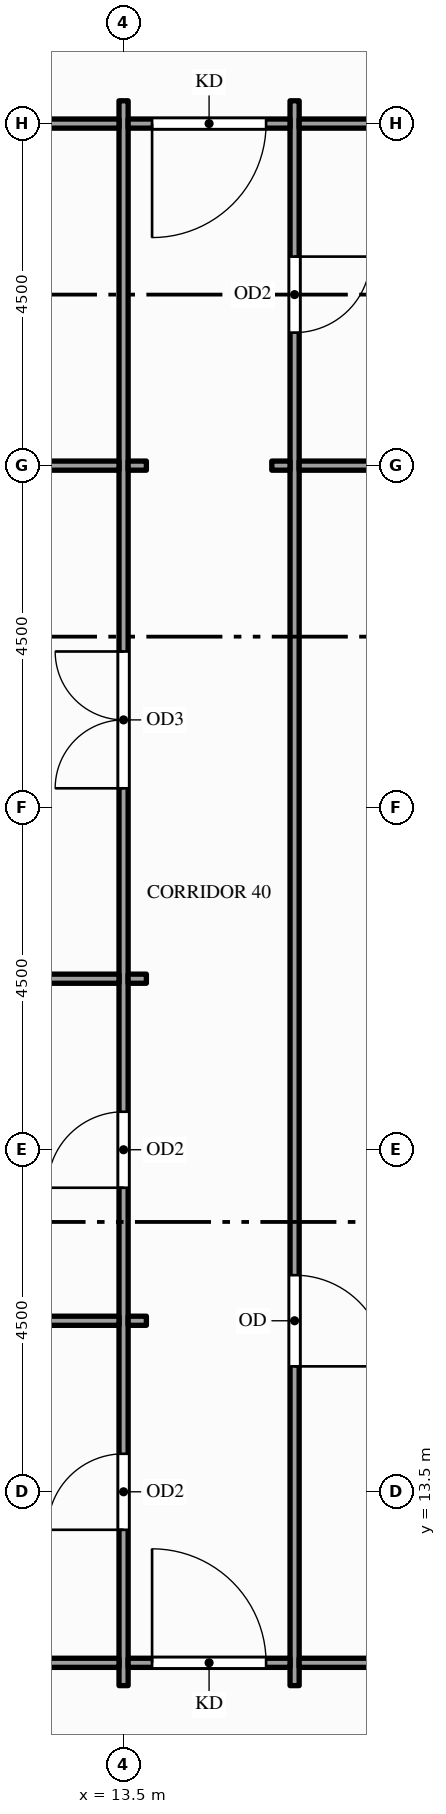
"""IFC4 building model, lengths in metres.
Left out: names, types, materials, properties, quantities, classifications, styles, units other than length and angle.
Written with IfcOpenShell. Run it as: python <this file> out.ifc"""

import sys

from ifc_helpers import new_model, si_unit, direction, frame, frame_2d, origin, place, context, subcontext, project, spatial, rectangle, extrude, element, fill, save


model = new_model("IFC4")
c1 = context("Model", 3, precision=1e-05, world=origin(), true_north=direction((0.0, 1.0)))
c2 = subcontext(c1, "Body", "Model", "MODEL_VIEW")
j1 = project(units=[si_unit("LENGTHUNIT", "METRE"), si_unit("PLANEANGLEUNIT", "RADIAN")], contexts=[c1])
p1 = place(None, origin())
s1 = spatial("IfcSite", under=j1, at=p1, CompositionType="ELEMENT")
p2 = place(p1, origin())
s2 = spatial("IfcBuilding", under=s1, at=p2, CompositionType="ELEMENT")
p3 = place(p2, frame((0.0, 0.0, 61.0)))
s3 = spatial("IfcBuildingStorey", under=s2, at=p3, CompositionType="ELEMENT", Elevation=61.0)
p4 = place(p3, frame((13.5, 10.95, 0.0), z_axis=(0.0, 0.0, 1.0), x_axis=(0.0, 1.0, 0.0)))
e1 = element("IfcWall", 1, at=p4, inside=s3, PredefinedType="PARTITIONING", context=c2, shape_type="SweptSolid", body=[
    extrude(rectangle(XDim=20.85, YDim=0.12, at=frame_2d((10.425, 0.0))), origin(), (0.0, 0.0, 1.0), 2.6),
])
p5 = place(p4, frame((2.05, 0.0, 0.0)))
e2 = element("IfcOpeningElement", 2, at=p5, cuts=e1, PredefinedType="OPENING", context=c2, shape_type="SweptSolid", body=[
    extrude(rectangle(XDim=1.0, YDim=2.1, at=frame_2d((0.5, 1.05))), frame((0.0, 0.07, 0.0), z_axis=(0.0, -1.0, 0.0), x_axis=(1.0, 0.0, 0.0)), (0.0, 0.0, 1.0), 0.14),
])
p6 = place(p4, frame((6.55, 0.0, 0.0)))
e3 = element("IfcOpeningElement", 3, at=p6, cuts=e1, PredefinedType="OPENING", context=c2, shape_type="SweptSolid", body=[
    extrude(rectangle(XDim=1.0, YDim=2.1, at=frame_2d((0.5, 1.05))), frame((0.0, 0.07, 0.0), z_axis=(0.0, -1.0, 0.0), x_axis=(1.0, 0.0, 0.0)), (0.0, 0.0, 1.0), 0.14),
])
p7 = place(p4, frame((11.805, 0.0, 0.0)))
e4 = element("IfcOpeningElement", 4, at=p7, cuts=e1, PredefinedType="OPENING", context=c2, shape_type="SweptSolid", body=[
    extrude(rectangle(XDim=1.8, YDim=2.1, at=frame_2d((0.9, 1.05))), frame((0.0, 0.07, 0.0), z_axis=(0.0, -1.0, 0.0), x_axis=(1.0, 0.0, 0.0)), (0.0, 0.0, 1.0), 0.14),
])
p8 = place(p3, frame((15.75, 10.95, 0.0), z_axis=(0.0, 0.0, 1.0), x_axis=(0.0, 1.0, 0.0)))
e5 = element("IfcWall", 5, at=p8, inside=s3, PredefinedType="PARTITIONING", context=c2, shape_type="SweptSolid", body=[
    extrude(rectangle(XDim=20.85, YDim=0.12, at=frame_2d((10.425, 0.0))), origin(), (0.0, 0.0, 1.0), 2.6),
])
p9 = place(p8, frame((17.8, 0.0, 0.0)))
e6 = element("IfcOpeningElement", 6, at=p9, cuts=e5, PredefinedType="OPENING", context=c2, shape_type="SweptSolid", body=[
    extrude(rectangle(XDim=1.0, YDim=2.1, at=frame_2d((0.5, 1.05))), frame((0.0, 0.07, 0.0), z_axis=(0.0, -1.0, 0.0), x_axis=(1.0, 0.0, 0.0)), (0.0, 0.0, 1.0), 0.14),
])
p10 = place(p8, frame((4.2, 0.0, 0.0)))
e7 = element("IfcOpeningElement", 7, at=p10, cuts=e5, PredefinedType="OPENING", context=c2, shape_type="SweptSolid", body=[
    extrude(rectangle(XDim=1.2, YDim=2.1, at=frame_2d((0.6, 1.05))), frame((0.0, 0.07, 0.0), z_axis=(0.0, -1.0, 0.0), x_axis=(1.0, 0.0, 0.0)), (0.0, 0.0, 1.0), 0.14),
])
p11 = place(p3, frame((0.15, 11.25, 0.0), z_axis=(0.0, 0.0, 1.0), x_axis=(1.0, 0.0, 0.0)))
e8 = element("IfcWall", 8, at=p11, inside=s3, PredefinedType="PARTITIONING", context=c2, shape_type="SweptSolid", body=[
    extrude(rectangle(XDim=13.29, YDim=0.12, at=frame_2d((6.645, 0.0))), origin(), (0.0, 0.0, 1.0), 2.938),
])
p12 = place(p3, frame((13.56, 11.25, 0.0), z_axis=(0.0, 0.0, 1.0), x_axis=(1.0, 0.0, 0.0)))
e9 = element("IfcWall", 9, at=p12, inside=s3, PredefinedType="PARTITIONING", context=c2, shape_type="SweptSolid", body=[
    extrude(rectangle(XDim=2.13, YDim=0.12, at=frame_2d((1.065, 0.0))), origin(), (0.0, 0.0, 1.0), 2.938),
])
p13 = place(p12, frame((0.315, 0.0, 0.0)))
e10 = element("IfcOpeningElement", 10, at=p13, cuts=e9, PredefinedType="OPENING", context=c2, shape_type="SweptSolid", body=[
    extrude(rectangle(XDim=1.5, YDim=2.1, at=frame_2d((0.75, 1.05))), frame((0.0, 0.07, 0.0), z_axis=(0.0, -1.0, 0.0), x_axis=(1.0, 0.0, 0.0)), (0.0, 0.0, 1.0), 0.14),
])
p14 = place(p3, frame((15.81, 11.25, 0.0), z_axis=(0.0, 0.0, 1.0), x_axis=(1.0, 0.0, 0.0)))
e11 = element("IfcWall", 11, at=p14, inside=s3, PredefinedType="PARTITIONING", context=c2, shape_type="SweptSolid", body=[
    extrude(rectangle(XDim=15.63, YDim=0.12, at=frame_2d((7.815, 0.0))), origin(), (0.0, 0.0, 1.0), 2.938),
])
p15 = place(p14, frame((3.54, 0.0, 0.0)))
e12 = element("IfcOpeningElement", 12, at=p15, cuts=e11, PredefinedType="OPENING", context=c2, shape_type="SweptSolid", body=[
    extrude(rectangle(XDim=1.8, YDim=2.1, at=frame_2d((0.9, 1.05))), frame((0.0, 0.07, 0.0), z_axis=(0.0, -1.0, 0.0), x_axis=(1.0, 0.0, 0.0)), (0.0, 0.0, 1.0), 0.14),
])
p16 = place(p3, frame((0.15, 15.75, 0.0), z_axis=(0.0, 0.0, 1.0), x_axis=(1.0, 0.0, 0.0)))
e13 = element("IfcWall", 13, at=p16, inside=s3, PredefinedType="PARTITIONING", context=c2, shape_type="SweptSolid", body=[
    extrude(rectangle(XDim=13.29, YDim=0.12, at=frame_2d((6.645, 0.0))), origin(), (0.0, 0.0, 1.0), 2.938),
])
p17 = place(p3, frame((13.56, 15.75, 0.0), z_axis=(0.0, 0.0, 1.0), x_axis=(1.0, 0.0, 0.0)))
e14 = element("IfcWall", 14, at=p17, inside=s3, PredefinedType="PARTITIONING", context=c2, shape_type="SweptSolid", body=[
    extrude(rectangle(XDim=0.24, YDim=0.12, at=frame_2d((0.12, 0.0))), origin(), (0.0, 0.0, 1.0), 2.938),
])
p18 = place(p3, frame((0.15, 20.25, 0.0), z_axis=(0.0, 0.0, 1.0), x_axis=(1.0, 0.0, 0.0)))
e15 = element("IfcWall", 15, at=p18, inside=s3, PredefinedType="PARTITIONING", context=c2, shape_type="SweptSolid", body=[
    extrude(rectangle(XDim=13.29, YDim=0.12, at=frame_2d((6.645, 0.0))), origin(), (0.0, 0.0, 1.0), 2.938),
])
p19 = place(p3, frame((13.56, 20.25, 0.0), z_axis=(0.0, 0.0, 1.0), x_axis=(1.0, 0.0, 0.0)))
e16 = element("IfcWall", 16, at=p19, inside=s3, PredefinedType="PARTITIONING", context=c2, shape_type="SweptSolid", body=[
    extrude(rectangle(XDim=0.24, YDim=0.12, at=frame_2d((0.12, 0.0))), origin(), (0.0, 0.0, 1.0), 2.938),
])
p20 = place(p3, frame((8.56, 27.0, 0.0), z_axis=(0.0, 0.0, 1.0), x_axis=(1.0, 0.0, 0.0)))
e17 = element("IfcWall", 17, at=p20, inside=s3, PredefinedType="PARTITIONING", context=c2, shape_type="SweptSolid", body=[
    extrude(rectangle(XDim=4.88, YDim=0.12, at=frame_2d((2.44, 0.0))), origin(), (0.0, 0.0, 1.0), 2.938),
])
for number, where, z_axis, x_axis in (
    (18, (13.56, 27.0, 0.0), (0.0, 0.0, 1.0), (1.0, 0.0, 0.0)),
    (19, (15.45, 27.0, 0.0), (0.0, 0.0, 1.0), (1.0, 0.0, 0.0)),
):
    element("IfcWall", number, at=place(p3, frame(where, z_axis=z_axis, x_axis=x_axis)), inside=s3, PredefinedType="PARTITIONING", context=c2, shape_type="SweptSolid", body=[
        extrude(rectangle(XDim=0.24, YDim=0.12, at=frame_2d((0.12, 0.0))), origin(), (0.0, 0.0, 1.0), 2.938),
    ])
p21 = place(p3, frame((15.81, 27.0, 0.0), z_axis=(0.0, 0.0, 1.0), x_axis=(1.0, 0.0, 0.0)))
e20 = element("IfcWall", 20, at=p21, inside=s3, PredefinedType="PARTITIONING", context=c2, shape_type="SweptSolid", body=[
    extrude(rectangle(XDim=5.32, YDim=0.12, at=frame_2d((2.66, 0.0))), origin(), (0.0, 0.0, 1.0), 2.938),
])
p22 = place(p3, frame((8.56, 31.5, 0.0), z_axis=(0.0, 0.0, 1.0), x_axis=(1.0, 0.0, 0.0)))
e21 = element("IfcWall", 21, at=p22, inside=s3, PredefinedType="PARTITIONING", context=c2, shape_type="SweptSolid", body=[
    extrude(rectangle(XDim=4.88, YDim=0.12, at=frame_2d((2.44, 0.0))), origin(), (0.0, 0.0, 1.0), 2.938),
])
p23 = place(p22, frame((1.94, 0.0, 0.0)))
e22 = element("IfcOpeningElement", 22, at=p23, cuts=e21, PredefinedType="OPENING", context=c2, shape_type="SweptSolid", body=[
    extrude(rectangle(XDim=1.0, YDim=2.1, at=frame_2d((0.5, 1.05))), frame((0.0, 0.07, 0.0), z_axis=(0.0, -1.0, 0.0), x_axis=(1.0, 0.0, 0.0)), (0.0, 0.0, 1.0), 0.14),
])
p24 = place(p3, frame((13.56, 31.5, 0.0), z_axis=(0.0, 0.0, 1.0), x_axis=(1.0, 0.0, 0.0)))
e23 = element("IfcWall", 23, at=p24, inside=s3, PredefinedType="PARTITIONING", context=c2, shape_type="SweptSolid", body=[
    extrude(rectangle(XDim=2.13, YDim=0.12, at=frame_2d((1.065, 0.0))), origin(), (0.0, 0.0, 1.0), 2.938),
])
p25 = place(p24, frame((0.315, 0.0, 0.0)))
e24 = element("IfcOpeningElement", 24, at=p25, cuts=e23, PredefinedType="OPENING", context=c2, shape_type="SweptSolid", body=[
    extrude(rectangle(XDim=1.5, YDim=2.1, at=frame_2d((0.75, 1.05))), frame((0.0, 0.07, 0.0), z_axis=(0.0, -1.0, 0.0), x_axis=(1.0, 0.0, 0.0)), (0.0, 0.0, 1.0), 0.14),
])
p26 = place(p3, frame((15.81, 31.5, 0.0), z_axis=(0.0, 0.0, 1.0), x_axis=(1.0, 0.0, 0.0)))
e25 = element("IfcWall", 25, at=p26, inside=s3, PredefinedType="PARTITIONING", context=c2, shape_type="SweptSolid", body=[
    extrude(rectangle(XDim=5.04, YDim=0.12, at=frame_2d((2.52, 0.0))), origin(), (0.0, 0.0, 1.0), 2.938),
])
p27 = place(p13, origin())
e26 = element("IfcDoor", 26, at=p27, inside=s3, OperationType="SINGLE_SWING_LEFT", PredefinedType="DOOR", context=c2, shape_type="SweptSolid", body=[
    extrude(rectangle(XDim=1.5, YDim=2.1, at=frame_2d((0.75, 1.05))), frame((0.0, 0.025, 0.0), z_axis=(0.0, -1.0, 0.0), x_axis=(1.0, 0.0, 0.0)), (0.0, 0.0, 1.0), 0.05),
])
fill(e10, e26)
p28 = place(p25, origin())
e27 = element("IfcDoor", 27, at=p28, inside=s3, OperationType="SINGLE_SWING_LEFT", PredefinedType="DOOR", context=c2, shape_type="SweptSolid", body=[
    extrude(rectangle(XDim=1.5, YDim=2.1, at=frame_2d((0.75, 1.05))), frame((0.0, 0.025, 0.0), z_axis=(0.0, -1.0, 0.0), x_axis=(1.0, 0.0, 0.0)), (0.0, 0.0, 1.0), 0.05),
])
fill(e24, e27)
p29 = place(p5, origin())
e28 = element("IfcDoor", 28, at=p29, inside=s3, OperationType="SINGLE_SWING_LEFT", PredefinedType="DOOR", context=c2, shape_type="SweptSolid", body=[
    extrude(rectangle(XDim=1.0, YDim=2.1, at=frame_2d((0.5, 1.05))), frame((0.0, 0.025, 0.0), z_axis=(0.0, -1.0, 0.0), x_axis=(1.0, 0.0, 0.0)), (0.0, 0.0, 1.0), 0.05),
])
fill(e2, e28)
p30 = place(p6, origin())
e29 = element("IfcDoor", 29, at=p30, inside=s3, OperationType="SINGLE_SWING_LEFT", PredefinedType="DOOR", context=c2, shape_type="SweptSolid", body=[
    extrude(rectangle(XDim=1.0, YDim=2.1, at=frame_2d((0.5, 1.05))), frame((0.0, 0.025, 0.0), z_axis=(0.0, -1.0, 0.0), x_axis=(1.0, 0.0, 0.0)), (0.0, 0.0, 1.0), 0.05),
])
fill(e3, e29)
p31 = place(p7, origin())
e30 = element("IfcDoor", 30, at=p31, inside=s3, OperationType="DOUBLE_DOOR_SINGLE_SWING", PredefinedType="DOOR", context=c2, shape_type="SweptSolid", body=[
    extrude(rectangle(XDim=1.8, YDim=2.1, at=frame_2d((0.9, 1.05))), frame((0.0, 0.025, 0.0), z_axis=(0.0, -1.0, 0.0), x_axis=(1.0, 0.0, 0.0)), (0.0, 0.0, 1.0), 0.05),
])
fill(e4, e30)
p32 = place(p9, origin())
e31 = element("IfcDoor", 31, at=p32, inside=s3, OperationType="SINGLE_SWING_RIGHT", PredefinedType="DOOR", context=c2, shape_type="SweptSolid", body=[
    extrude(rectangle(XDim=1.0, YDim=2.1, at=frame_2d((0.5, 1.05))), frame((0.0, 0.025, 0.0), z_axis=(0.0, -1.0, 0.0), x_axis=(1.0, 0.0, 0.0)), (0.0, 0.0, 1.0), 0.05),
])
fill(e6, e31)
p33 = place(p10, origin())
e32 = element("IfcDoor", 32, at=p33, inside=s3, OperationType="SINGLE_SWING_LEFT", PredefinedType="DOOR", context=c2, shape_type="SweptSolid", body=[
    extrude(rectangle(XDim=1.2, YDim=2.1, at=frame_2d((0.6, 1.05))), frame((0.0, 0.025, 0.0), z_axis=(0.0, -1.0, 0.0), x_axis=(1.0, 0.0, 0.0)), (0.0, 0.0, 1.0), 0.05),
])
fill(e7, e32)
save(model, sys.argv[1])
